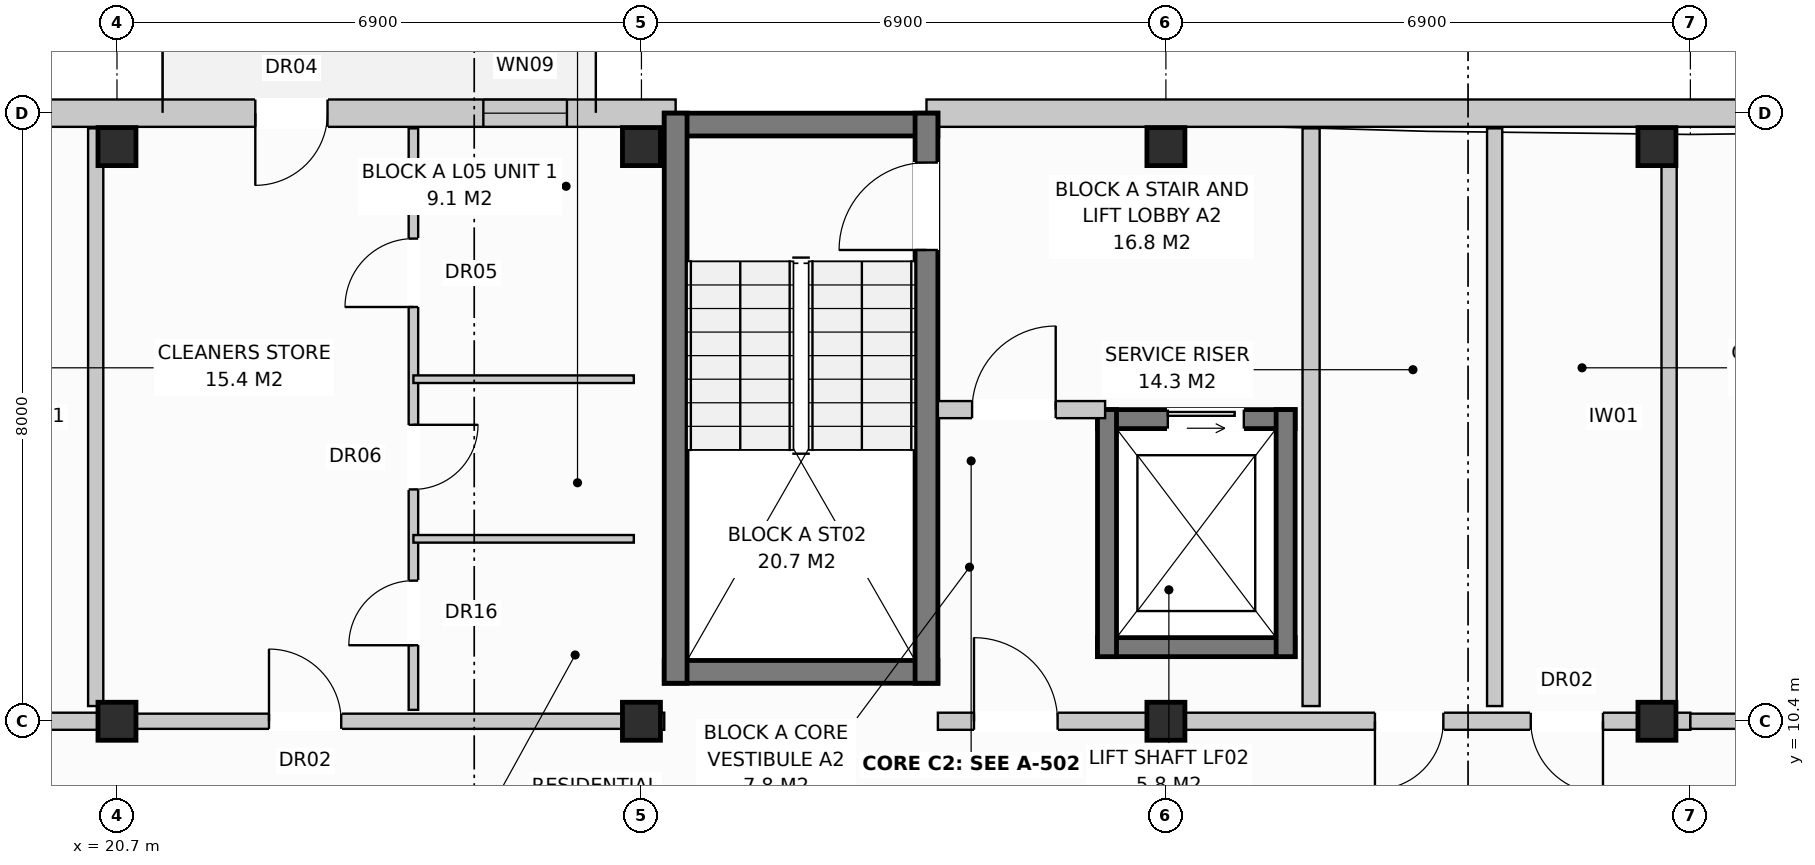
"""IFC4 building model, lengths in metres.
Left out: names, types, materials, properties, quantities, classifications, styles, units other than length and angle.
Written with IfcOpenShell. Run it as: python <this file> out.ifc"""

import sys

from ifc_helpers import new_model, si_unit, direction, frame, frame_2d, origin, origin_with_axes, origin_2d, place, context, subcontext, project, spatial, rectangle, extrude, element, fill, save


model = new_model("IFC4")
c1 = context("Model", 3, precision=1e-05, world=origin(), true_north=direction((0.0, 1.0)))
c2 = subcontext(c1, "Body", "Model", "MODEL_VIEW")
j1 = project(units=[si_unit("LENGTHUNIT", "METRE"), si_unit("PLANEANGLEUNIT", "RADIAN")], contexts=[c1])
p1 = place(None, origin())
s1 = spatial("IfcSite", under=j1, at=p1, CompositionType="ELEMENT")
p2 = place(p1, origin())
s2 = spatial("IfcBuilding", under=s1, at=p2, CompositionType="ELEMENT")
p3 = place(p2, frame((0.0, 0.0, 17.6)))
s3 = spatial("IfcBuildingStorey", under=s2, at=p3, CompositionType="ELEMENT", Elevation=17.6)
for number, where, z_axis, x_axis in (
    (1, (20.7, 10.4, 0.0), (0.0, 0.0, 1.0), (1.0, 0.0, 0.0)),
    (2, (20.7, 17.96, 0.0), (0.0, 0.0, 1.0), (1.0, 0.0, 0.0)),
    (3, (27.6, 10.4, 0.0), (0.0, 0.0, 1.0), (1.0, 0.0, 0.0)),
    (4, (27.6, 17.96, 0.0), (0.0, 0.0, 1.0), (1.0, 0.0, 0.0)),
    (5, (34.5, 10.4, 0.0), (0.0, 0.0, 1.0), (1.0, 0.0, 0.0)),
    (6, (34.5, 17.96, 0.0), (0.0, 0.0, 1.0), (1.0, 0.0, 0.0)),
    (7, (40.96, 10.4, 0.0), (0.0, 0.0, 1.0), (1.0, 0.0, 0.0)),
    (8, (40.96, 17.96, 0.0), (0.0, 0.0, 1.0), (1.0, 0.0, 0.0)),
):
    element("IfcColumn", number, at=place(p3, frame(where, z_axis=z_axis, x_axis=x_axis)), inside=s3, PredefinedType="COLUMN", context=c2, shape_type="SweptSolid", body=[
        extrude(rectangle(XDim=0.5, YDim=0.5, at=origin_2d()), origin(), (0.0, 0.0, 1.0), 3.2),
    ])
p4 = place(p3, frame((10.65, 18.4, 0.0), z_axis=(0.0, 0.0, 1.0), x_axis=(1.0, 0.0, 0.0)))
e9 = element("IfcWall", 9, at=p4, inside=s3, PredefinedType="STANDARD", context=c2, shape_type="SweptSolid", body=[
    extrude(rectangle(XDim=17.4, YDim=0.36, at=frame_2d((8.7, 0.0))), origin(), (0.0, 0.0, 1.0), 2.95),
])
p5 = place(p4, frame((11.87, 0.0, 0.0)))
e10 = element("IfcOpeningElement", 10, at=p5, cuts=e9, PredefinedType="OPENING", context=c2, shape_type="SweptSolid", body=[
    extrude(rectangle(XDim=0.95, YDim=2.1, at=frame_2d((0.475, 1.05))), frame((0.0, 0.192, 0.0), z_axis=(0.0, -1.0, 0.0), x_axis=(1.0, 0.0, 0.0)), (0.0, 0.0, 1.0), 0.384),
])
p6 = place(p4, frame((14.87, 0.0, 0.72)))
e11 = element("IfcOpeningElement", 11, at=p6, cuts=e9, PredefinedType="OPENING", context=c2, shape_type="SweptSolid", body=[
    extrude(rectangle(XDim=1.1, YDim=1.5, at=frame_2d((0.55, 0.75))), frame((0.0, 0.192, 0.0), z_axis=(0.0, -1.0, 0.0), x_axis=(1.0, 0.0, 0.0)), (0.0, 0.0, 1.0), 0.384),
])
p7 = place(p3, frame((31.35, 18.4, 0.0), z_axis=(0.0, 0.0, 1.0), x_axis=(1.0, 0.0, 0.0)))
e12 = element("IfcWall", 12, at=p7, inside=s3, PredefinedType="STANDARD", context=c2, shape_type="SweptSolid", body=[
    extrude(rectangle(XDim=23.68, YDim=0.36, at=frame_2d((11.84, 0.0))), origin(), (0.0, 0.0, 1.0), 2.95),
])
p8 = place(p7, frame((14.048, 0.0, 0.0)))
e13 = element("IfcOpeningElement", 13, at=p8, cuts=e12, PredefinedType="OPENING", context=c2, shape_type="SweptSolid", body=[
    extrude(rectangle(XDim=0.95, YDim=2.1, at=frame_2d((0.475, 1.05))), frame((0.0, 0.192, 0.0), z_axis=(0.0, -1.0, 0.0), x_axis=(1.0, 0.0, 0.0)), (0.0, 0.0, 1.0), 0.384),
])
p9 = place(p7, frame((12.17, 0.0, 0.72)))
e14 = element("IfcOpeningElement", 14, at=p9, cuts=e12, PredefinedType="OPENING", context=c2, shape_type="SweptSolid", body=[
    extrude(rectangle(XDim=1.1, YDim=1.5, at=frame_2d((0.55, 0.75))), frame((0.0, 0.192, 0.0), z_axis=(0.0, -1.0, 0.0), x_axis=(1.0, 0.0, 0.0)), (0.0, 0.0, 1.0), 0.384),
])
p10 = place(p7, frame((17.403, 0.0, 0.8)))
e15 = element("IfcOpeningElement", 15, at=p10, cuts=e12, PredefinedType="OPENING", context=c2, shape_type="SweptSolid", body=[
    extrude(rectangle(XDim=1.95, YDim=1.65, at=frame_2d((0.975, 0.825))), frame((0.0, 0.192, 0.0), z_axis=(0.0, -1.0, 0.0), x_axis=(1.0, 0.0, 0.0)), (0.0, 0.0, 1.0), 0.384),
])
p11 = place(p7, frame((21.07, 0.0, 0.72)))
e16 = element("IfcOpeningElement", 16, at=p11, cuts=e12, PredefinedType="OPENING", context=c2, shape_type="SweptSolid", body=[
    extrude(rectangle(XDim=1.1, YDim=1.5, at=frame_2d((0.55, 0.75))), frame((0.0, 0.192, 0.0), z_axis=(0.0, -1.0, 0.0), x_axis=(1.0, 0.0, 0.0)), (0.0, 0.0, 1.0), 0.384),
])
p12 = place(p3, frame((20.42, 10.6, 0.0), z_axis=(0.0, 0.0, 1.0), x_axis=(0.0, 1.0, 0.0)))
e17 = element("IfcWall", 17, at=p12, inside=s3, PredefinedType="PARTITIONING", context=c2, shape_type="SweptSolid", body=[
    extrude(rectangle(XDim=7.6, YDim=0.2, at=frame_2d((3.8, 0.0))), origin(), (0.0, 0.0, 1.0), 2.95),
])
p13 = place(p3, frame((10.8, 10.4, 0.0), z_axis=(0.0, 0.0, 1.0), x_axis=(1.0, 0.0, 0.0)))
e18 = element("IfcWall", 18, at=p13, inside=s3, PredefinedType="PARTITIONING", context=c2, shape_type="SweptSolid", body=[
    extrude(rectangle(XDim=9.9, YDim=0.225, at=frame_2d((4.95, 0.0))), origin(), (0.0, 0.0, 1.0), 2.39),
])
p14 = place(p13, frame((0.475, 0.0, 0.0)))
e19 = element("IfcOpeningElement", 19, at=p14, cuts=e18, PredefinedType="OPENING", context=c2, shape_type="SweptSolid", body=[
    extrude(rectangle(XDim=1.1, YDim=2.15, at=frame_2d((0.55, 1.075))), frame((0.0, 0.125, 0.0), z_axis=(0.0, -1.0, 0.0), x_axis=(1.0, 0.0, 0.0)), (0.0, 0.0, 1.0), 0.249),
])
p15 = place(p13, frame((5.75, 0.0, 0.0)))
e20 = element("IfcOpeningElement", 20, at=p15, cuts=e18, PredefinedType="OPENING", context=c2, shape_type="SweptSolid", body=[
    extrude(rectangle(XDim=0.9, YDim=2.1, at=frame_2d((0.45, 1.05))), frame((0.0, 0.125, 0.0), z_axis=(0.0, -1.0, 0.0), x_axis=(1.0, 0.0, 0.0)), (0.0, 0.0, 1.0), 0.249),
])
p16 = place(p13, frame((7.8, 0.0, 0.0)))
e21 = element("IfcOpeningElement", 21, at=p16, cuts=e18, PredefinedType="OPENING", context=c2, shape_type="SweptSolid", body=[
    extrude(rectangle(XDim=0.95, YDim=2.15, at=frame_2d((0.475, 1.075))), frame((0.0, 0.125, 0.0), z_axis=(0.0, -1.0, 0.0), x_axis=(1.0, 0.0, 0.0)), (0.0, 0.0, 1.0), 0.249),
])
for number, where, z_axis, x_axis in (
    (22, (27.9, 18.25, 0.0), (0.0, 0.0, 1.0), (1.0, 0.0, 0.0)),
    (23, (27.9, 11.05, 0.0), (0.0, 0.0, 1.0), (1.0, 0.0, 0.0)),
):
    element("IfcWall", number, at=place(p3, frame(where, z_axis=z_axis, x_axis=x_axis)), inside=s3, PredefinedType="SHEAR", context=c2, shape_type="SweptSolid", body=[
        extrude(rectangle(XDim=3.6, YDim=0.3, at=frame_2d((1.8, 0.0))), origin(), (0.0, 0.0, 1.0), 2.95),
    ])
p17 = place(p3, frame((28.05, 10.9, 0.0), z_axis=(0.0, 0.0, 1.0), x_axis=(0.0, 1.0, 0.0)))
e24 = element("IfcWall", 24, at=p17, inside=s3, PredefinedType="SHEAR", context=c2, shape_type="SweptSolid", body=[
    extrude(rectangle(XDim=7.5, YDim=0.3, at=frame_2d((3.75, 0.0))), origin(), (0.0, 0.0, 1.0), 2.95),
])
p18 = place(p3, frame((31.35, 10.9, 0.0), z_axis=(0.0, 0.0, 1.0), x_axis=(0.0, 1.0, 0.0)))
e25 = element("IfcWall", 25, at=p18, inside=s3, PredefinedType="SHEAR", context=c2, shape_type="SweptSolid", body=[
    extrude(rectangle(XDim=7.5, YDim=0.3, at=frame_2d((3.75, 0.0))), origin(), (0.0, 0.0, 1.0), 2.95),
])
p19 = place(p18, frame((5.7, 0.0, 0.0)))
e26 = element("IfcOpeningElement", 26, at=p19, cuts=e25, PredefinedType="OPENING", context=c2, shape_type="SweptSolid", body=[
    extrude(rectangle(XDim=1.15, YDim=2.15, at=frame_2d((0.575, 1.075))), frame((0.0, 0.162, 0.0), z_axis=(0.0, -1.0, 0.0), x_axis=(1.0, 0.0, 0.0)), (0.0, 0.0, 1.0), 0.324),
])
p20 = place(p3, frame((33.6, 14.375, 0.0), z_axis=(0.0, 0.0, 1.0), x_axis=(1.0, 0.0, 0.0)))
e27 = element("IfcWall", 27, at=p20, inside=s3, PredefinedType="SHEAR", context=c2, shape_type="SweptSolid", body=[
    extrude(rectangle(XDim=2.6, YDim=0.25, at=frame_2d((1.3, 0.0))), origin(), (0.0, 0.0, 1.0), 2.95),
])
p21 = place(p20, frame((0.925, 0.0, 0.0)))
e28 = element("IfcOpeningElement", 28, at=p21, cuts=e27, PredefinedType="OPENING", context=c2, shape_type="SweptSolid", body=[
    extrude(rectangle(XDim=1.0, YDim=2.1, at=frame_2d((0.5, 1.05))), frame((0.0, 0.137, 0.0), z_axis=(0.0, -1.0, 0.0), x_axis=(1.0, 0.0, 0.0)), (0.0, 0.0, 1.0), 0.274),
])
p22 = place(p3, frame((33.6, 11.375, 0.0), z_axis=(0.0, 0.0, 1.0), x_axis=(1.0, 0.0, 0.0)))
e29 = element("IfcWall", 29, at=p22, inside=s3, PredefinedType="SHEAR", context=c2, shape_type="SweptSolid", body=[
    extrude(rectangle(XDim=2.6, YDim=0.25, at=frame_2d((1.3, 0.0))), origin(), (0.0, 0.0, 1.0), 2.95),
])
for number, where, z_axis, x_axis in (
    (30, (33.725, 11.25, 0.0), (0.0, 0.0, 1.0), (0.0, 1.0, 0.0)),
    (31, (36.075, 11.25, 0.0), (0.0, 0.0, 1.0), (0.0, 1.0, 0.0)),
):
    element("IfcWall", number, at=place(p3, frame(where, z_axis=z_axis, x_axis=x_axis)), inside=s3, PredefinedType="SHEAR", context=c2, shape_type="SweptSolid", body=[
        extrude(rectangle(XDim=3.25, YDim=0.25, at=frame_2d((1.625, 0.0))), origin(), (0.0, 0.0, 1.0), 2.95),
    ])
p23 = place(p3, frame((36.41, 10.6, 0.0), z_axis=(0.0, 0.0, 1.0), x_axis=(0.0, 1.0, 0.0)))
e32 = element("IfcWall", 32, at=p23, inside=s3, PredefinedType="PARTITIONING", context=c2, shape_type="SweptSolid", body=[
    extrude(rectangle(XDim=7.6, YDim=0.225, at=frame_2d((3.8, 0.0))), origin(), (0.0, 0.0, 1.0), 2.59),
])
p24 = place(p3, frame((31.5, 14.5, 0.0), z_axis=(0.0, 0.0, 1.0), x_axis=(1.0, 0.0, 0.0)))
e33 = element("IfcWall", 33, at=p24, inside=s3, PredefinedType="PARTITIONING", context=c2, shape_type="SweptSolid", body=[
    extrude(rectangle(XDim=2.2, YDim=0.225, at=frame_2d((1.1, 0.0))), origin(), (0.0, 0.0, 1.0), 2.95),
])
p25 = place(p24, frame((0.45, 0.0, 0.0)))
e34 = element("IfcOpeningElement", 34, at=p25, cuts=e33, PredefinedType="OPENING", context=c2, shape_type="SweptSolid", body=[
    extrude(rectangle(XDim=1.1, YDim=2.15, at=frame_2d((0.55, 1.075))), frame((0.0, 0.125, 0.0), z_axis=(0.0, -1.0, 0.0), x_axis=(1.0, 0.0, 0.0)), (0.0, 0.0, 1.0), 0.249),
])
p26 = place(p3, frame((27.6, 10.4, 0.0), z_axis=(0.0, 0.0, 1.0), x_axis=(1.0, 0.0, 0.0)))
e35 = element("IfcWall", 35, at=p26, inside=s3, PredefinedType="PARTITIONING", context=c2, shape_type="SweptSolid", body=[
    extrude(rectangle(XDim=0.3, YDim=0.225, at=frame_2d((0.15, 0.0))), origin(), (0.0, 0.0, 1.0), 2.95),
])
for number, where, z_axis, x_axis in (
    (36, (38.825, 10.6, 0.0), (0.0, 0.0, 1.0), (0.0, 1.0, 0.0)),
    (37, (41.12, 10.6, 0.0), (0.0, 0.0, 1.0), (0.0, 1.0, 0.0)),
):
    element("IfcWall", number, at=place(p3, frame(where, z_axis=z_axis, x_axis=x_axis)), inside=s3, PredefinedType="PARTITIONING", context=c2, shape_type="SweptSolid", body=[
        extrude(rectangle(XDim=7.6, YDim=0.2, at=frame_2d((3.8, 0.0))), origin(), (0.0, 0.0, 1.0), 2.95),
    ])
p27 = place(p3, frame((31.5, 10.4, 0.0), z_axis=(0.0, 0.0, 1.0), x_axis=(1.0, 0.0, 0.0)))
e38 = element("IfcWall", 38, at=p27, inside=s3, PredefinedType="PARTITIONING", context=c2, shape_type="SweptSolid", body=[
    extrude(rectangle(XDim=9.9, YDim=0.225, at=frame_2d((4.95, 0.0))), origin(), (0.0, 0.0, 1.0), 2.39),
])
p28 = place(p27, frame((0.475, 0.0, 0.0)))
e39 = element("IfcOpeningElement", 39, at=p28, cuts=e38, PredefinedType="OPENING", context=c2, shape_type="SweptSolid", body=[
    extrude(rectangle(XDim=1.1, YDim=2.15, at=frame_2d((0.55, 1.075))), frame((0.0, 0.125, 0.0), z_axis=(0.0, -1.0, 0.0), x_axis=(1.0, 0.0, 0.0)), (0.0, 0.0, 1.0), 0.249),
])
p29 = place(p27, frame((5.75, 0.0, 0.0)))
e40 = element("IfcOpeningElement", 40, at=p29, cuts=e38, PredefinedType="OPENING", context=c2, shape_type="SweptSolid", body=[
    extrude(rectangle(XDim=0.9, YDim=2.1, at=frame_2d((0.45, 1.05))), frame((0.0, 0.125, 0.0), z_axis=(0.0, -1.0, 0.0), x_axis=(1.0, 0.0, 0.0)), (0.0, 0.0, 1.0), 0.249),
])
p30 = place(p27, frame((7.8, 0.0, 0.0)))
e41 = element("IfcOpeningElement", 41, at=p30, cuts=e38, PredefinedType="OPENING", context=c2, shape_type="SweptSolid", body=[
    extrude(rectangle(XDim=0.95, YDim=2.15, at=frame_2d((0.475, 1.075))), frame((0.0, 0.125, 0.0), z_axis=(0.0, -1.0, 0.0), x_axis=(1.0, 0.0, 0.0)), (0.0, 0.0, 1.0), 0.249),
])
p31 = place(p3, frame((20.7, 10.4, 0.0), z_axis=(0.0, 0.0, 1.0), x_axis=(1.0, 0.0, 0.0)))
e42 = element("IfcWall", 42, at=p31, inside=s3, PredefinedType="PARTITIONING", context=c2, shape_type="SweptSolid", body=[
    extrude(rectangle(XDim=6.9, YDim=0.2, at=frame_2d((3.45, 0.0))), origin(), (0.0, 0.0, 1.0), 2.39),
])
p32 = place(p31, frame((2.0, 0.0, 0.0)))
e43 = element("IfcOpeningElement", 43, at=p32, cuts=e42, PredefinedType="OPENING", context=c2, shape_type="SweptSolid", body=[
    extrude(rectangle(XDim=0.95, YDim=2.15, at=frame_2d((0.475, 1.075))), frame((0.0, 0.112, 0.0), z_axis=(0.0, -1.0, 0.0), x_axis=(1.0, 0.0, 0.0)), (0.0, 0.0, 1.0), 0.224),
])
p33 = place(p3, frame((24.6, 10.55, 0.0), z_axis=(0.0, 0.0, 1.0), x_axis=(0.0, 1.0, 0.0)))
e44 = element("IfcWall", 44, at=p33, inside=s3, PredefinedType="PARTITIONING", context=c2, shape_type="SweptSolid", body=[
    extrude(rectangle(XDim=7.65, YDim=0.125, at=frame_2d((3.825, 0.0))), origin(), (0.0, 0.0, 1.0), 2.95),
])
p34 = place(p33, frame((0.85, 0.0, 0.0)))
e45 = element("IfcOpeningElement", 45, at=p34, cuts=e44, PredefinedType="OPENING", context=c2, shape_type="SweptSolid", body=[
    extrude(rectangle(XDim=0.85, YDim=2.1, at=frame_2d((0.425, 1.05))), frame((0.0, 0.074, 0.0), z_axis=(0.0, -1.0, 0.0), x_axis=(1.0, 0.0, 0.0)), (0.0, 0.0, 1.0), 0.149),
])
p35 = place(p33, frame((2.9, 0.0, 0.0)))
e46 = element("IfcOpeningElement", 46, at=p35, cuts=e44, PredefinedType="OPENING", context=c2, shape_type="SweptSolid", body=[
    extrude(rectangle(XDim=0.85, YDim=2.05, at=frame_2d((0.425, 1.025))), frame((0.0, 0.074, 0.0), z_axis=(0.0, -1.0, 0.0), x_axis=(1.0, 0.0, 0.0)), (0.0, 0.0, 1.0), 0.149),
])
p36 = place(p33, frame((5.3, 0.0, 0.0)))
e47 = element("IfcOpeningElement", 47, at=p36, cuts=e44, PredefinedType="OPENING", context=c2, shape_type="SweptSolid", body=[
    extrude(rectangle(XDim=0.9, YDim=2.1, at=frame_2d((0.45, 1.05))), frame((0.0, 0.074, 0.0), z_axis=(0.0, -1.0, 0.0), x_axis=(1.0, 0.0, 0.0)), (0.0, 0.0, 1.0), 0.149),
])
for number, where, z_axis, x_axis in (
    (48, (24.6, 12.8, 0.0), (0.0, 0.0, 1.0), (1.0, 0.0, 0.0)),
    (49, (24.6, 14.9, 0.0), (0.0, 0.0, 1.0), (1.0, 0.0, 0.0)),
):
    element("IfcWall", number, at=place(p3, frame(where, z_axis=z_axis, x_axis=x_axis)), inside=s3, PredefinedType="PARTITIONING", context=c2, shape_type="SweptSolid", body=[
        extrude(rectangle(XDim=2.9, YDim=0.1, at=frame_2d((1.45, 0.0))), origin(), (0.0, 0.0, 1.0), 2.95),
    ])
p37 = place(p3, frame((41.4, 10.4, 0.0), z_axis=(0.0, 0.0, 1.0), x_axis=(1.0, 0.0, 0.0)))
e50 = element("IfcWall", 50, at=p37, inside=s3, PredefinedType="PARTITIONING", context=c2, shape_type="SweptSolid", body=[
    extrude(rectangle(XDim=13.8, YDim=0.2, at=frame_2d((6.9, 0.0))), origin(), (0.0, 0.0, 1.0), 2.39),
])
p38 = place(p37, frame((2.4, 0.0, 0.0)))
e51 = element("IfcOpeningElement", 51, at=p38, cuts=e50, PredefinedType="OPENING", context=c2, shape_type="SweptSolid", body=[
    extrude(rectangle(XDim=0.95, YDim=2.15, at=frame_2d((0.475, 1.075))), frame((0.0, 0.112, 0.0), z_axis=(0.0, -1.0, 0.0), x_axis=(1.0, 0.0, 0.0)), (0.0, 0.0, 1.0), 0.224),
])
p39 = place(p5, frame((0.95, 0.0, 0.0), z_axis=(0.0, 0.0, 1.0), x_axis=(-1.0, 0.0, 0.0)))
e52 = element("IfcDoor", 52, at=p39, inside=s3, OperationType="SINGLE_SWING_LEFT", PredefinedType="DOOR", context=c2, shape_type="SweptSolid", body=[
    extrude(rectangle(XDim=0.95, YDim=2.1, at=frame_2d((0.475, 1.05))), frame((0.0, 0.025, 0.0), z_axis=(0.0, -1.0, 0.0), x_axis=(1.0, 0.0, 0.0)), (0.0, 0.0, 1.0), 0.05),
])
fill(e10, e52)
p40 = place(p6, origin_with_axes())
e53 = element("IfcWindow", 53, at=p40, inside=s3, PartitioningType="SINGLE_PANEL", PredefinedType="WINDOW", context=c2, shape_type="SweptSolid", body=[
    extrude(rectangle(XDim=1.1, YDim=1.5, at=frame_2d((0.55, 0.75))), frame((0.0, 0.03, 0.0), z_axis=(0.0, -1.0, 0.0), x_axis=(1.0, 0.0, 0.0)), (0.0, 0.0, 1.0), 0.06),
])
fill(e11, e53)
p41 = place(p19, origin_with_axes())
e54 = element("IfcDoor", 54, at=p41, inside=s3, OperationType="SINGLE_SWING_LEFT", PredefinedType="DOOR", context=c2, shape_type="SweptSolid", body=[
    extrude(rectangle(XDim=1.15, YDim=2.15, at=frame_2d((0.575, 1.075))), frame((0.0, 0.025, 0.0), z_axis=(0.0, -1.0, 0.0), x_axis=(1.0, 0.0, 0.0)), (0.0, 0.0, 1.0), 0.05),
])
fill(e26, e54)
p42 = place(p21, origin_with_axes())
e55 = element("IfcDoor", 55, at=p42, inside=s3, OperationType="SLIDING_TO_LEFT", PredefinedType="DOOR", context=c2, shape_type="SweptSolid", body=[
    extrude(rectangle(XDim=1.0, YDim=2.1, at=frame_2d((0.5, 1.05))), frame((0.0, 0.025, 0.0), z_axis=(0.0, -1.0, 0.0), x_axis=(1.0, 0.0, 0.0)), (0.0, 0.0, 1.0), 0.05),
])
fill(e28, e55)
p43 = place(p25, origin_with_axes())
e56 = element("IfcDoor", 56, at=p43, inside=s3, OperationType="SINGLE_SWING_RIGHT", PredefinedType="DOOR", context=c2, shape_type="SweptSolid", body=[
    extrude(rectangle(XDim=1.1, YDim=2.15, at=frame_2d((0.55, 1.075))), frame((0.0, 0.025, 0.0), z_axis=(0.0, -1.0, 0.0), x_axis=(1.0, 0.0, 0.0)), (0.0, 0.0, 1.0), 0.05),
])
fill(e34, e56)
p44 = place(p28, origin_with_axes())
e57 = element("IfcDoor", 57, at=p44, inside=s3, OperationType="SINGLE_SWING_LEFT", PredefinedType="DOOR", context=c2, shape_type="SweptSolid", body=[
    extrude(rectangle(XDim=1.1, YDim=2.15, at=frame_2d((0.55, 1.075))), frame((0.0, 0.025, 0.0), z_axis=(0.0, -1.0, 0.0), x_axis=(1.0, 0.0, 0.0)), (0.0, 0.0, 1.0), 0.05),
])
fill(e39, e57)
p45 = place(p29, frame((0.9, 0.0, 0.0), z_axis=(0.0, 0.0, 1.0), x_axis=(-1.0, 0.0, 0.0)))
e58 = element("IfcDoor", 58, at=p45, inside=s3, OperationType="SINGLE_SWING_LEFT", PredefinedType="DOOR", context=c2, shape_type="SweptSolid", body=[
    extrude(rectangle(XDim=0.9, YDim=2.1, at=frame_2d((0.45, 1.05))), frame((0.0, 0.025, 0.0), z_axis=(0.0, -1.0, 0.0), x_axis=(1.0, 0.0, 0.0)), (0.0, 0.0, 1.0), 0.05),
])
fill(e40, e58)
p46 = place(p30, frame((0.95, 0.0, 0.0), z_axis=(0.0, 0.0, 1.0), x_axis=(-1.0, 0.0, 0.0)))
e59 = element("IfcDoor", 59, at=p46, inside=s3, OperationType="SINGLE_SWING_RIGHT", PredefinedType="DOOR", context=c2, shape_type="SweptSolid", body=[
    extrude(rectangle(XDim=0.95, YDim=2.15, at=frame_2d((0.475, 1.075))), frame((0.0, 0.025, 0.0), z_axis=(0.0, -1.0, 0.0), x_axis=(1.0, 0.0, 0.0)), (0.0, 0.0, 1.0), 0.05),
])
fill(e41, e59)
p47 = place(p32, origin_with_axes())
e60 = element("IfcDoor", 60, at=p47, inside=s3, OperationType="SINGLE_SWING_LEFT", PredefinedType="DOOR", context=c2, shape_type="SweptSolid", body=[
    extrude(rectangle(XDim=0.95, YDim=2.15, at=frame_2d((0.475, 1.075))), frame((0.0, 0.025, 0.0), z_axis=(0.0, -1.0, 0.0), x_axis=(1.0, 0.0, 0.0)), (0.0, 0.0, 1.0), 0.05),
])
fill(e43, e60)
p48 = place(p34, origin_with_axes())
e61 = element("IfcDoor", 61, at=p48, inside=s3, OperationType="SINGLE_SWING_LEFT", PredefinedType="DOOR", context=c2, shape_type="SweptSolid", body=[
    extrude(rectangle(XDim=0.85, YDim=2.1, at=frame_2d((0.425, 1.05))), frame((0.0, 0.025, 0.0), z_axis=(0.0, -1.0, 0.0), x_axis=(1.0, 0.0, 0.0)), (0.0, 0.0, 1.0), 0.05),
])
fill(e45, e61)
p49 = place(p35, frame((0.85, 0.0, 0.0), z_axis=(0.0, 0.0, 1.0), x_axis=(-1.0, 0.0, 0.0)))
e62 = element("IfcDoor", 62, at=p49, inside=s3, OperationType="SINGLE_SWING_RIGHT", PredefinedType="DOOR", context=c2, shape_type="SweptSolid", body=[
    extrude(rectangle(XDim=0.85, YDim=2.05, at=frame_2d((0.425, 1.025))), frame((0.0, 0.025, 0.0), z_axis=(0.0, -1.0, 0.0), x_axis=(1.0, 0.0, 0.0)), (0.0, 0.0, 1.0), 0.05),
])
fill(e46, e62)
p50 = place(p36, origin_with_axes())
e63 = element("IfcDoor", 63, at=p50, inside=s3, OperationType="SINGLE_SWING_LEFT", PredefinedType="DOOR", context=c2, shape_type="SweptSolid", body=[
    extrude(rectangle(XDim=0.9, YDim=2.1, at=frame_2d((0.45, 1.05))), frame((0.0, 0.025, 0.0), z_axis=(0.0, -1.0, 0.0), x_axis=(1.0, 0.0, 0.0)), (0.0, 0.0, 1.0), 0.05),
])
fill(e47, e63)
save(model, sys.argv[1])
